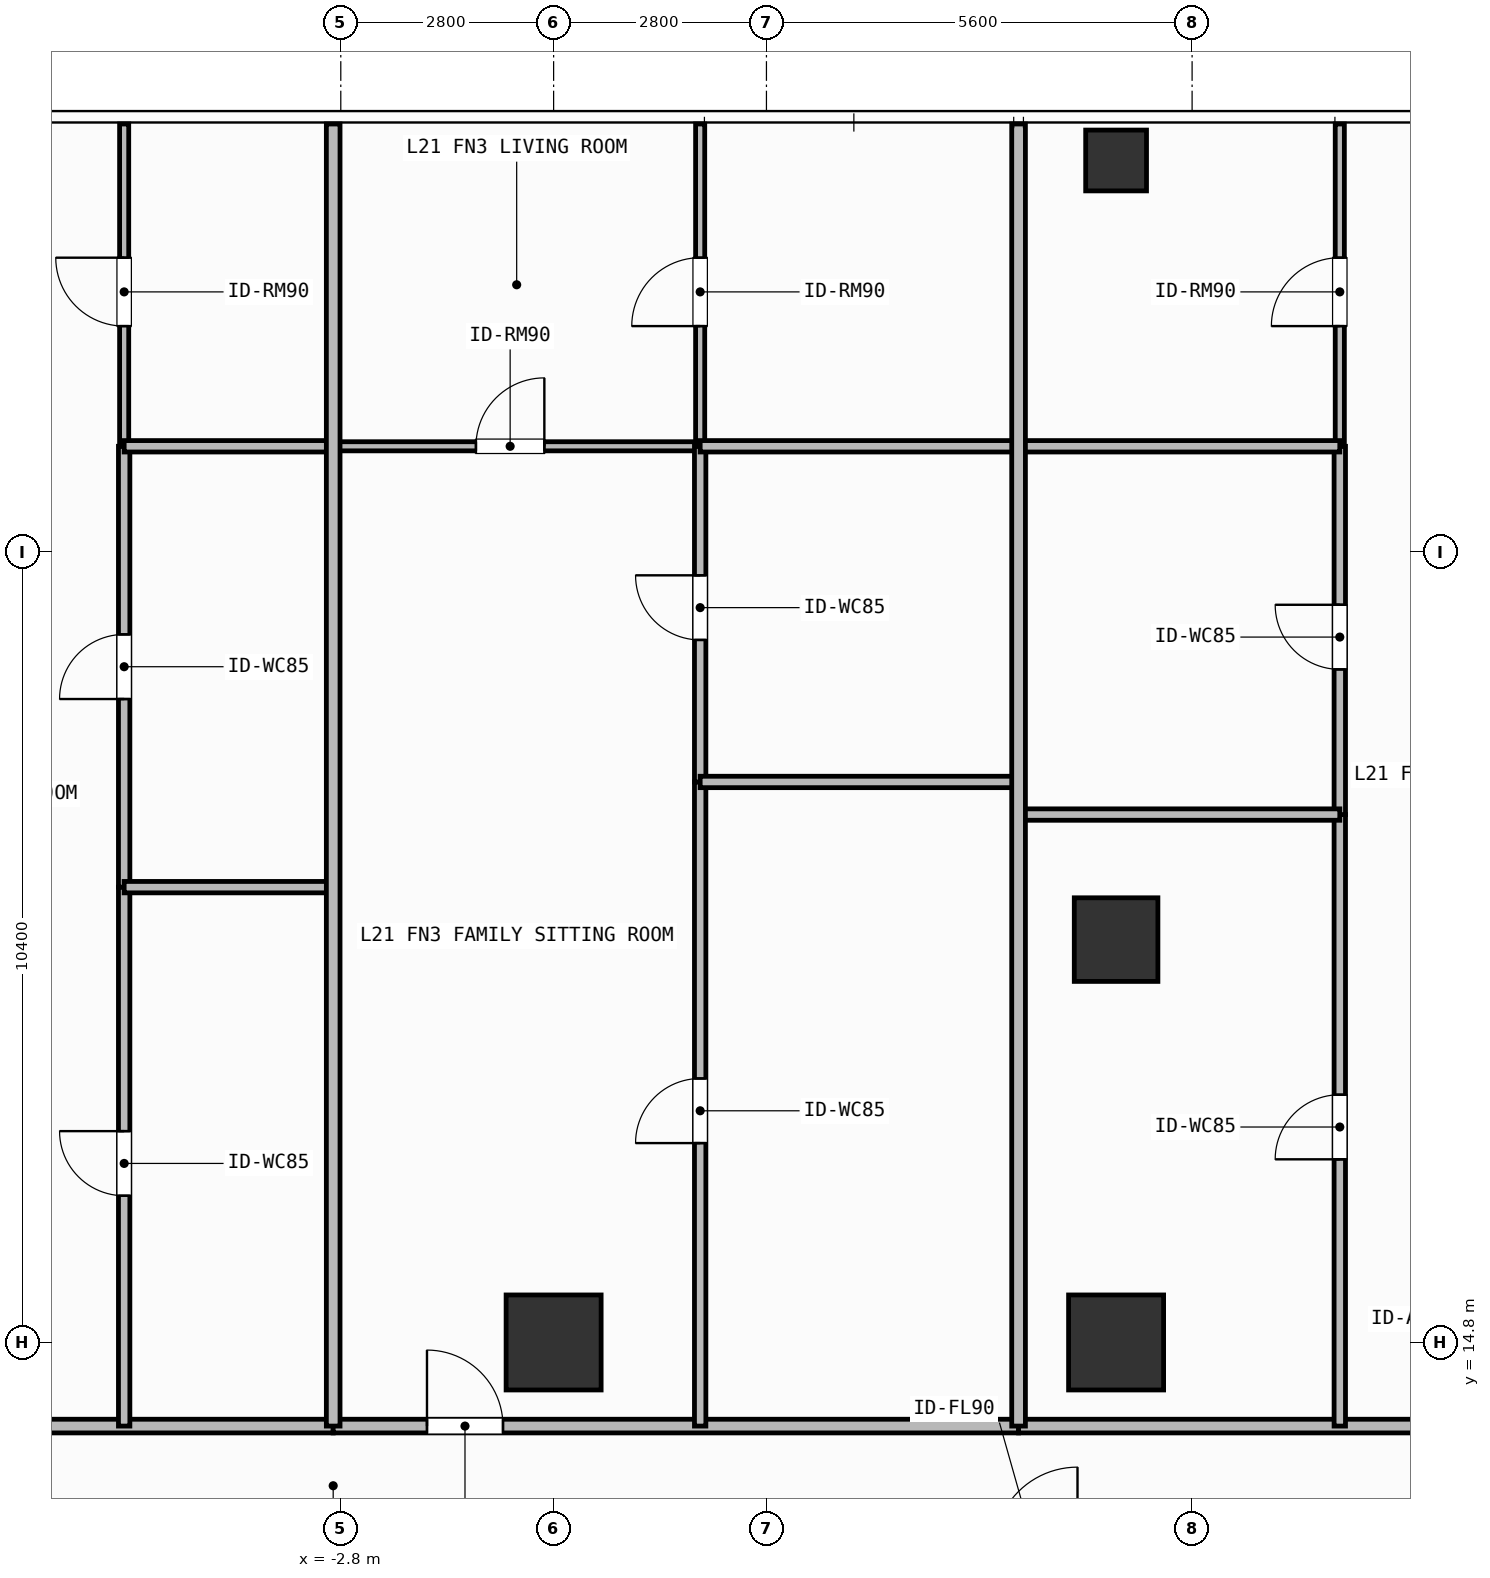
"""IFC4 building model, lengths in metres.
Left out: names, types, materials, properties, quantities, classifications, styles, units other than length and angle.
Written with IfcOpenShell. Run it as: python <this file> out.ifc"""

import sys

from ifc_helpers import new_model, si_unit, direction, frame, frame_2d, origin, origin_2d, place, context, subcontext, project, spatial, rectangle, hollow_rectangle, extrude, element, fill, save


model = new_model("IFC4")
c1 = context("Model", 3, precision=1e-05, world=origin(), true_north=direction((0.0, 1.0)))
c2 = subcontext(c1, "Body", "Model", "MODEL_VIEW")
j1 = project(units=[si_unit("LENGTHUNIT", "METRE"), si_unit("PLANEANGLEUNIT", "RADIAN")], contexts=[c1])
p1 = place(None, origin())
s1 = spatial("IfcSite", under=j1, at=p1, CompositionType="ELEMENT")
p2 = place(p1, origin())
s2 = spatial("IfcBuilding", under=s1, at=p2, CompositionType="ELEMENT")
p3 = place(p2, frame((0.0, 0.0, 85.2)))
s3 = spatial("IfcBuildingStorey", under=s2, at=p3, CompositionType="ELEMENT", Elevation=85.2)
for number, where, z_axis, x_axis in (
    (1, (0.0, 14.8, 0.0), (0.0, 0.0, 1.0), (1.0, 0.0, 0.0)),
    (2, (7.4, 14.8, 0.0), (0.0, 0.0, 1.0), (1.0, 0.0, 0.0)),
):
    element("IfcColumn", number, at=place(p3, frame(where, z_axis=z_axis, x_axis=x_axis)), inside=s3, PredefinedType="COLUMN", context=c2, shape_type="SweptSolid", body=[
        extrude(rectangle(XDim=1.25, YDim=1.25, at=origin_2d()), origin(), (0.0, 0.0, 1.0), 3.9),
    ])
p4 = place(p3, frame((7.4, 20.1, 0.0), z_axis=(0.0, 0.0, 1.0), x_axis=(1.0, 0.0, 0.0)))
e3 = element("IfcColumn", 3, at=p4, inside=s3, PredefinedType="COLUMN", context=c2, shape_type="SweptSolid", body=[
    extrude(rectangle(XDim=1.1, YDim=1.1, at=origin_2d()), origin(), (0.0, 0.0, 1.0), 3.9),
])
p5 = place(p3, frame((7.4, 30.35, 0.0), z_axis=(0.0, 0.0, 1.0), x_axis=(1.0, 0.0, 0.0)))
e4 = element("IfcColumn", 4, at=p5, inside=s3, PredefinedType="COLUMN", context=c2, shape_type="SweptSolid", body=[
    extrude(hollow_rectangle(XDim=0.8, YDim=0.8, WallThickness=0.036, at=origin_2d()), origin(), (0.0, 0.0, 1.0), 3.9),
])
p6 = place(p3, frame((-9.786, 13.7, 0.0), z_axis=(0.0, 0.0, 1.0), x_axis=(1.0, 0.0, 0.0)))
e5 = element("IfcWall", 5, at=p6, inside=s3, PredefinedType="PARTITIONING", context=c2, shape_type="SweptSolid", body=[
    extrude(rectangle(XDim=6.886, YDim=0.18, at=frame_2d((3.443, 0.0))), origin(), (0.0, 0.0, 1.0), 3.68),
])
p7 = place(p6, frame((0.698, 0.0, 0.0)))
e6 = element("IfcOpeningElement", 6, at=p7, cuts=e5, PredefinedType="OPENING", context=c2, shape_type="SweptSolid", body=[
    extrude(rectangle(XDim=1.0, YDim=2.2, at=frame_2d((0.5, 1.1))), frame((0.0, 0.1, 0.0), z_axis=(0.0, -1.0, 0.0), x_axis=(1.0, 0.0, 0.0)), (0.0, 0.0, 1.0), 0.2),
])
p8 = place(p3, frame((-5.65, 13.7, 0.0), z_axis=(0.0, 0.0, 1.0), x_axis=(0.0, 1.0, 0.0)))
e7 = element("IfcWall", 7, at=p8, inside=s3, PredefinedType="PARTITIONING", context=c2, shape_type="SweptSolid", body=[
    extrude(rectangle(XDim=7.09, YDim=0.15, at=frame_2d((3.545, 0.0))), origin(), (0.0, 0.0, 1.0), 3.68),
])
p9 = place(p8, frame((3.03, 0.0, 0.0)))
e8 = element("IfcOpeningElement", 8, at=p9, cuts=e7, PredefinedType="OPENING", context=c2, shape_type="SweptSolid", body=[
    extrude(rectangle(XDim=0.85, YDim=2.1, at=frame_2d((0.425, 1.05))), frame((0.0, 0.085, 0.0), z_axis=(0.0, -1.0, 0.0), x_axis=(1.0, 0.0, 0.0)), (0.0, 0.0, 1.0), 0.17),
])
p10 = place(p3, frame((-5.65, 20.79, 0.0), z_axis=(0.0, 0.0, 1.0), x_axis=(0.0, 1.0, 0.0)))
e9 = element("IfcWall", 9, at=p10, inside=s3, PredefinedType="PARTITIONING", context=c2, shape_type="SweptSolid", body=[
    extrude(rectangle(XDim=5.8, YDim=0.15, at=frame_2d((2.9, 0.0))), origin(), (0.0, 0.0, 1.0), 3.68),
])
p11 = place(p10, frame((2.475, 0.0, 0.0)))
e10 = element("IfcOpeningElement", 10, at=p11, cuts=e9, PredefinedType="OPENING", context=c2, shape_type="SweptSolid", body=[
    extrude(rectangle(XDim=0.85, YDim=2.1, at=frame_2d((0.425, 1.05))), frame((0.0, 0.085, 0.0), z_axis=(0.0, -1.0, 0.0), x_axis=(1.0, 0.0, 0.0)), (0.0, 0.0, 1.0), 0.17),
])
p12 = place(p3, frame((-5.65, 26.59, 0.0), z_axis=(0.0, 0.0, 1.0), x_axis=(0.0, 1.0, 0.0)))
e11 = element("IfcWall", 11, at=p12, inside=s3, PredefinedType="PARTITIONING", context=c2, shape_type="SweptSolid", body=[
    extrude(rectangle(XDim=4.24, YDim=0.12, at=frame_2d((2.12, 0.0))), origin(), (0.0, 0.0, 1.0), 3.68),
])
p13 = place(p12, frame((1.581, 0.0, 0.0)))
e12 = element("IfcOpeningElement", 12, at=p13, cuts=e11, PredefinedType="OPENING", context=c2, shape_type="SweptSolid", body=[
    extrude(rectangle(XDim=0.9, YDim=2.1, at=frame_2d((0.45, 1.05))), frame((0.0, 0.07, 0.0), z_axis=(0.0, -1.0, 0.0), x_axis=(1.0, 0.0, 0.0)), (0.0, 0.0, 1.0), 0.14),
])
p14 = place(p3, frame((-2.9, 13.7, 0.0), z_axis=(0.0, 0.0, 1.0), x_axis=(1.0, 0.0, 0.0)))
e13 = element("IfcWall", 13, at=p14, inside=s3, PredefinedType="PARTITIONING", context=c2, shape_type="SweptSolid", body=[
    extrude(rectangle(XDim=9.017, YDim=0.18, at=frame_2d((4.508, 0.0))), origin(), (0.0, 0.0, 1.0), 3.68),
])
p15 = place(p14, frame((1.234, 0.0, 0.0)))
e14 = element("IfcOpeningElement", 14, at=p15, cuts=e13, PredefinedType="OPENING", context=c2, shape_type="SweptSolid", body=[
    extrude(rectangle(XDim=1.0, YDim=2.2, at=frame_2d((0.5, 1.1))), frame((0.0, 0.1, 0.0), z_axis=(0.0, -1.0, 0.0), x_axis=(1.0, 0.0, 0.0)), (0.0, 0.0, 1.0), 0.2),
])
p16 = place(p3, frame((-2.9, 26.59, 0.0), z_axis=(0.0, 0.0, 1.0), x_axis=(1.0, 0.0, 0.0)))
e15 = element("IfcWall", 15, at=p16, inside=s3, PredefinedType="PARTITIONING", context=c2, shape_type="SweptSolid", body=[
    extrude(rectangle(XDim=4.828, YDim=0.12, at=frame_2d((2.414, 0.0))), origin(), (0.0, 0.0, 1.0), 3.68),
])
p17 = place(p16, frame((1.878, 0.0, 0.0)))
e16 = element("IfcOpeningElement", 16, at=p17, cuts=e15, PredefinedType="OPENING", context=c2, shape_type="SweptSolid", body=[
    extrude(rectangle(XDim=0.9, YDim=2.1, at=frame_2d((0.45, 1.05))), frame((0.0, 0.07, 0.0), z_axis=(0.0, -1.0, 0.0), x_axis=(1.0, 0.0, 0.0)), (0.0, 0.0, 1.0), 0.14),
])
p18 = place(p3, frame((1.928, 13.7, 0.0), z_axis=(0.0, 0.0, 1.0), x_axis=(0.0, 1.0, 0.0)))
e17 = element("IfcWall", 17, at=p18, inside=s3, PredefinedType="PARTITIONING", context=c2, shape_type="SweptSolid", body=[
    extrude(rectangle(XDim=8.474, YDim=0.15, at=frame_2d((4.237, 0.0))), origin(), (0.0, 0.0, 1.0), 3.68),
])
p19 = place(p18, frame((3.723, 0.0, 0.0)))
e18 = element("IfcOpeningElement", 18, at=p19, cuts=e17, PredefinedType="OPENING", context=c2, shape_type="SweptSolid", body=[
    extrude(rectangle(XDim=0.85, YDim=2.1, at=frame_2d((0.425, 1.05))), frame((0.0, 0.085, 0.0), z_axis=(0.0, -1.0, 0.0), x_axis=(1.0, 0.0, 0.0)), (0.0, 0.0, 1.0), 0.17),
])
p20 = place(p3, frame((1.928, 22.174, 0.0), z_axis=(0.0, 0.0, 1.0), x_axis=(0.0, 1.0, 0.0)))
e19 = element("IfcWall", 19, at=p20, inside=s3, PredefinedType="PARTITIONING", context=c2, shape_type="SweptSolid", body=[
    extrude(rectangle(XDim=4.416, YDim=0.15, at=frame_2d((2.208, 0.0))), origin(), (0.0, 0.0, 1.0), 3.68),
])
p21 = place(p20, frame((1.868, 0.0, 0.0)))
e20 = element("IfcOpeningElement", 20, at=p21, cuts=e19, PredefinedType="OPENING", context=c2, shape_type="SweptSolid", body=[
    extrude(rectangle(XDim=0.85, YDim=2.1, at=frame_2d((0.425, 1.05))), frame((0.0, 0.085, 0.0), z_axis=(0.0, -1.0, 0.0), x_axis=(1.0, 0.0, 0.0)), (0.0, 0.0, 1.0), 0.17),
])
p22 = place(p3, frame((1.928, 26.59, 0.0), z_axis=(0.0, 0.0, 1.0), x_axis=(0.0, 1.0, 0.0)))
e21 = element("IfcWall", 21, at=p22, inside=s3, PredefinedType="PARTITIONING", context=c2, shape_type="SweptSolid", body=[
    extrude(rectangle(XDim=4.24, YDim=0.12, at=frame_2d((2.12, 0.0))), origin(), (0.0, 0.0, 1.0), 3.68),
])
p23 = place(p22, frame((1.581, 0.0, 0.0)))
e22 = element("IfcOpeningElement", 22, at=p23, cuts=e21, PredefinedType="OPENING", context=c2, shape_type="SweptSolid", body=[
    extrude(rectangle(XDim=0.9, YDim=2.1, at=frame_2d((0.45, 1.05))), frame((0.0, 0.07, 0.0), z_axis=(0.0, -1.0, 0.0), x_axis=(1.0, 0.0, 0.0)), (0.0, 0.0, 1.0), 0.14),
])
p24 = place(p3, frame((6.117, 13.7, 0.0), z_axis=(0.0, 0.0, 1.0), x_axis=(1.0, 0.0, 0.0)))
e23 = element("IfcWall", 23, at=p24, inside=s3, PredefinedType="PARTITIONING", context=c2, shape_type="SweptSolid", body=[
    extrude(rectangle(XDim=12.503, YDim=0.18, at=frame_2d((6.251, 0.0))), origin(), (0.0, 0.0, 1.0), 3.68),
])
p25 = place(p24, frame((5.485, 0.0, 0.0)))
e24 = element("IfcOpeningElement", 24, at=p25, cuts=e23, PredefinedType="OPENING", context=c2, shape_type="SweptSolid", body=[
    extrude(rectangle(XDim=1.0, YDim=2.2, at=frame_2d((0.5, 1.1))), frame((0.0, 0.1, 0.0), z_axis=(0.0, -1.0, 0.0), x_axis=(1.0, 0.0, 0.0)), (0.0, 0.0, 1.0), 0.2),
])
p26 = place(p3, frame((10.343, 13.7, 0.0), z_axis=(0.0, 0.0, 1.0), x_axis=(0.0, 1.0, 0.0)))
e25 = element("IfcWall", 25, at=p26, inside=s3, PredefinedType="PARTITIONING", context=c2, shape_type="SweptSolid", body=[
    extrude(rectangle(XDim=8.045, YDim=0.15, at=frame_2d((4.022, 0.0))), origin(), (0.0, 0.0, 1.0), 3.68),
])
p27 = place(p26, frame((3.51, 0.0, 0.0)))
e26 = element("IfcOpeningElement", 26, at=p27, cuts=e25, PredefinedType="OPENING", context=c2, shape_type="SweptSolid", body=[
    extrude(rectangle(XDim=0.85, YDim=2.1, at=frame_2d((0.425, 1.05))), frame((0.0, 0.085, 0.0), z_axis=(0.0, -1.0, 0.0), x_axis=(1.0, 0.0, 0.0)), (0.0, 0.0, 1.0), 0.17),
])
p28 = place(p3, frame((10.343, 21.745, 0.0), z_axis=(0.0, 0.0, 1.0), x_axis=(0.0, 1.0, 0.0)))
e27 = element("IfcWall", 27, at=p28, inside=s3, PredefinedType="PARTITIONING", context=c2, shape_type="SweptSolid", body=[
    extrude(rectangle(XDim=4.845, YDim=0.15, at=frame_2d((2.422, 0.0))), origin(), (0.0, 0.0, 1.0), 3.68),
])
p29 = place(p28, frame((1.91, 0.0, 0.0)))
e28 = element("IfcOpeningElement", 28, at=p29, cuts=e27, PredefinedType="OPENING", context=c2, shape_type="SweptSolid", body=[
    extrude(rectangle(XDim=0.85, YDim=2.1, at=frame_2d((0.425, 1.05))), frame((0.0, 0.085, 0.0), z_axis=(0.0, -1.0, 0.0), x_axis=(1.0, 0.0, 0.0)), (0.0, 0.0, 1.0), 0.17),
])
p30 = place(p3, frame((10.343, 26.59, 0.0), z_axis=(0.0, 0.0, 1.0), x_axis=(0.0, 1.0, 0.0)))
e29 = element("IfcWall", 29, at=p30, inside=s3, PredefinedType="PARTITIONING", context=c2, shape_type="SweptSolid", body=[
    extrude(rectangle(XDim=4.24, YDim=0.12, at=frame_2d((2.12, 0.0))), origin(), (0.0, 0.0, 1.0), 3.68),
])
p31 = place(p30, frame((1.581, 0.0, 0.0)))
e30 = element("IfcOpeningElement", 30, at=p31, cuts=e29, PredefinedType="OPENING", context=c2, shape_type="SweptSolid", body=[
    extrude(rectangle(XDim=0.9, YDim=2.1, at=frame_2d((0.45, 1.05))), frame((0.0, 0.07, 0.0), z_axis=(0.0, -1.0, 0.0), x_axis=(1.0, 0.0, 0.0)), (0.0, 0.0, 1.0), 0.14),
])
for number, where, z_axis, x_axis in (
    (31, (-5.65, 20.79, 0.0), (0.0, 0.0, 1.0), (1.0, 0.0, 0.0)),
    (32, (-5.65, 26.59, 0.0), (0.0, 0.0, 1.0), (1.0, 0.0, 0.0)),
):
    element("IfcWall", number, at=place(p3, frame(where, z_axis=z_axis, x_axis=x_axis)), inside=s3, PredefinedType="PARTITIONING", context=c2, shape_type="SweptSolid", body=[
        extrude(rectangle(XDim=2.75, YDim=0.15, at=frame_2d((1.375, 0.0))), origin(), (0.0, 0.0, 1.0), 3.68),
    ])
for number, where, z_axis, x_axis in (
    (33, (1.928, 22.174, 0.0), (0.0, 0.0, 1.0), (1.0, 0.0, 0.0)),
    (34, (1.928, 26.59, 0.0), (0.0, 0.0, 1.0), (1.0, 0.0, 0.0)),
):
    element("IfcWall", number, at=place(p3, frame(where, z_axis=z_axis, x_axis=x_axis)), inside=s3, PredefinedType="PARTITIONING", context=c2, shape_type="SweptSolid", body=[
        extrude(rectangle(XDim=4.189, YDim=0.15, at=frame_2d((2.094, 0.0))), origin(), (0.0, 0.0, 1.0), 3.68),
    ])
p32 = place(p3, frame((-2.9, 13.7, 0.0), z_axis=(0.0, 0.0, 1.0), x_axis=(0.0, 1.0, 0.0)))
e35 = element("IfcWall", 35, at=p32, inside=s3, PredefinedType="PARTITIONING", context=c2, shape_type="SweptSolid", body=[
    extrude(rectangle(XDim=17.13, YDim=0.18, at=frame_2d((8.565, 0.0))), origin(), (0.0, 0.0, 1.0), 3.68),
])
for number, where, z_axis, x_axis in (
    (36, (6.117, 21.745, 0.0), (0.0, 0.0, 1.0), (1.0, 0.0, 0.0)),
    (37, (6.117, 26.59, 0.0), (0.0, 0.0, 1.0), (1.0, 0.0, 0.0)),
):
    element("IfcWall", number, at=place(p3, frame(where, z_axis=z_axis, x_axis=x_axis)), inside=s3, PredefinedType="PARTITIONING", context=c2, shape_type="SweptSolid", body=[
        extrude(rectangle(XDim=4.226, YDim=0.15, at=frame_2d((2.113, 0.0))), origin(), (0.0, 0.0, 1.0), 3.68),
    ])
p33 = place(p3, frame((6.117, 13.7, 0.0), z_axis=(0.0, 0.0, 1.0), x_axis=(0.0, 1.0, 0.0)))
e38 = element("IfcWall", 38, at=p33, inside=s3, PredefinedType="PARTITIONING", context=c2, shape_type="SweptSolid", body=[
    extrude(rectangle(XDim=17.13, YDim=0.18, at=frame_2d((8.565, 0.0))), origin(), (0.0, 0.0, 1.0), 3.68),
])
p34 = place(p9, origin())
e39 = element("IfcDoor", 39, at=p34, inside=s3, OperationType="SINGLE_SWING_RIGHT", PredefinedType="DOOR", context=c2, shape_type="SweptSolid", body=[
    extrude(rectangle(XDim=0.85, YDim=2.1, at=frame_2d((0.425, 1.05))), frame((0.0, 0.025, 0.0), z_axis=(0.0, -1.0, 0.0), x_axis=(1.0, 0.0, 0.0)), (0.0, 0.0, 1.0), 0.05),
])
fill(e8, e39)
p35 = place(p11, origin())
e40 = element("IfcDoor", 40, at=p35, inside=s3, OperationType="SINGLE_SWING_LEFT", PredefinedType="DOOR", context=c2, shape_type="SweptSolid", body=[
    extrude(rectangle(XDim=0.85, YDim=2.1, at=frame_2d((0.425, 1.05))), frame((0.0, 0.025, 0.0), z_axis=(0.0, -1.0, 0.0), x_axis=(1.0, 0.0, 0.0)), (0.0, 0.0, 1.0), 0.05),
])
fill(e10, e40)
p36 = place(p13, origin())
e41 = element("IfcDoor", 41, at=p36, inside=s3, OperationType="SINGLE_SWING_RIGHT", PredefinedType="DOOR", context=c2, shape_type="SweptSolid", body=[
    extrude(rectangle(XDim=0.9, YDim=2.1, at=frame_2d((0.45, 1.05))), frame((0.0, 0.025, 0.0), z_axis=(0.0, -1.0, 0.0), x_axis=(1.0, 0.0, 0.0)), (0.0, 0.0, 1.0), 0.05),
])
fill(e12, e41)
p37 = place(p15, origin())
e42 = element("IfcDoor", 42, at=p37, inside=s3, OperationType="SINGLE_SWING_LEFT", PredefinedType="DOOR", context=c2, shape_type="SweptSolid", body=[
    extrude(rectangle(XDim=1.0, YDim=2.2, at=frame_2d((0.5, 1.1))), frame((0.0, 0.025, 0.0), z_axis=(0.0, -1.0, 0.0), x_axis=(1.0, 0.0, 0.0)), (0.0, 0.0, 1.0), 0.05),
])
fill(e14, e42)
p38 = place(p17, origin())
e43 = element("IfcDoor", 43, at=p38, inside=s3, OperationType="SINGLE_SWING_RIGHT", PredefinedType="DOOR", context=c2, shape_type="SweptSolid", body=[
    extrude(rectangle(XDim=0.9, YDim=2.1, at=frame_2d((0.45, 1.05))), frame((0.0, 0.025, 0.0), z_axis=(0.0, -1.0, 0.0), x_axis=(1.0, 0.0, 0.0)), (0.0, 0.0, 1.0), 0.05),
])
fill(e16, e43)
p39 = place(p19, origin())
e44 = element("IfcDoor", 44, at=p39, inside=s3, OperationType="SINGLE_SWING_LEFT", PredefinedType="DOOR", context=c2, shape_type="SweptSolid", body=[
    extrude(rectangle(XDim=0.85, YDim=2.1, at=frame_2d((0.425, 1.05))), frame((0.0, 0.025, 0.0), z_axis=(0.0, -1.0, 0.0), x_axis=(1.0, 0.0, 0.0)), (0.0, 0.0, 1.0), 0.05),
])
fill(e18, e44)
p40 = place(p21, origin())
e45 = element("IfcDoor", 45, at=p40, inside=s3, OperationType="SINGLE_SWING_RIGHT", PredefinedType="DOOR", context=c2, shape_type="SweptSolid", body=[
    extrude(rectangle(XDim=0.85, YDim=2.1, at=frame_2d((0.425, 1.05))), frame((0.0, 0.025, 0.0), z_axis=(0.0, -1.0, 0.0), x_axis=(1.0, 0.0, 0.0)), (0.0, 0.0, 1.0), 0.05),
])
fill(e20, e45)
p41 = place(p23, origin())
e46 = element("IfcDoor", 46, at=p41, inside=s3, OperationType="SINGLE_SWING_LEFT", PredefinedType="DOOR", context=c2, shape_type="SweptSolid", body=[
    extrude(rectangle(XDim=0.9, YDim=2.1, at=frame_2d((0.45, 1.05))), frame((0.0, 0.025, 0.0), z_axis=(0.0, -1.0, 0.0), x_axis=(1.0, 0.0, 0.0)), (0.0, 0.0, 1.0), 0.05),
])
fill(e22, e46)
p42 = place(p27, origin())
e47 = element("IfcDoor", 47, at=p42, inside=s3, OperationType="SINGLE_SWING_LEFT", PredefinedType="DOOR", context=c2, shape_type="SweptSolid", body=[
    extrude(rectangle(XDim=0.85, YDim=2.1, at=frame_2d((0.425, 1.05))), frame((0.0, 0.025, 0.0), z_axis=(0.0, -1.0, 0.0), x_axis=(1.0, 0.0, 0.0)), (0.0, 0.0, 1.0), 0.05),
])
fill(e26, e47)
p43 = place(p29, origin())
e48 = element("IfcDoor", 48, at=p43, inside=s3, OperationType="SINGLE_SWING_RIGHT", PredefinedType="DOOR", context=c2, shape_type="SweptSolid", body=[
    extrude(rectangle(XDim=0.85, YDim=2.1, at=frame_2d((0.425, 1.05))), frame((0.0, 0.025, 0.0), z_axis=(0.0, -1.0, 0.0), x_axis=(1.0, 0.0, 0.0)), (0.0, 0.0, 1.0), 0.05),
])
fill(e28, e48)
p44 = place(p31, origin())
e49 = element("IfcDoor", 49, at=p44, inside=s3, OperationType="SINGLE_SWING_LEFT", PredefinedType="DOOR", context=c2, shape_type="SweptSolid", body=[
    extrude(rectangle(XDim=0.9, YDim=2.1, at=frame_2d((0.45, 1.05))), frame((0.0, 0.025, 0.0), z_axis=(0.0, -1.0, 0.0), x_axis=(1.0, 0.0, 0.0)), (0.0, 0.0, 1.0), 0.05),
])
fill(e30, e49)
save(model, sys.argv[1])
